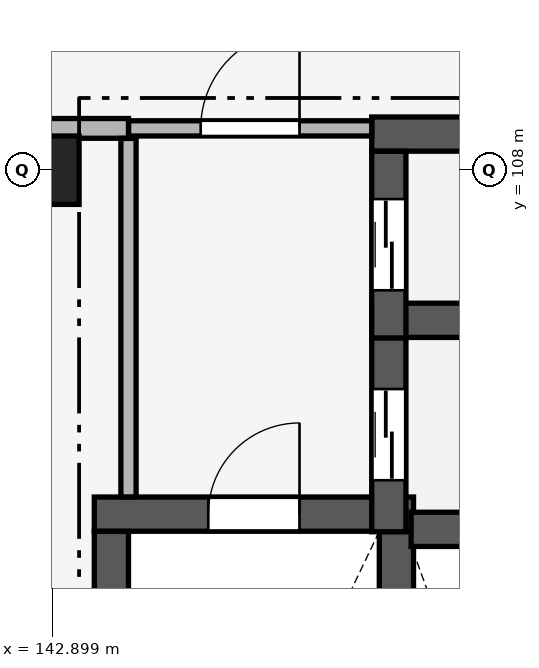
"""IFC4 building model, lengths in metres.
Left out: names, types, materials, properties, quantities, classifications, styles, units other than length and angle.
Written with IfcOpenShell. Run it as: python <this file> out.ifc"""

import sys

from ifc_helpers import new_model, si_unit, direction, frame, frame_2d, origin, origin_2d, place, context, subcontext, project, spatial, rectangle, extrude, element, fill, save


model = new_model("IFC4")
c1 = context("Model", 3, precision=1e-05, world=origin(), true_north=direction((0.0, 1.0)))
c2 = subcontext(c1, "Body", "Model", "MODEL_VIEW")
j1 = project(units=[si_unit("LENGTHUNIT", "METRE"), si_unit("PLANEANGLEUNIT", "RADIAN")], contexts=[c1])
p1 = place(None, origin())
s1 = spatial("IfcSite", under=j1, at=p1, CompositionType="ELEMENT")
p2 = place(p1, origin())
s2 = spatial("IfcBuilding", under=s1, at=p2, CompositionType="ELEMENT")
p3 = place(p2, frame((0.0, 0.0, 5.1)))
s3 = spatial("IfcBuildingStorey", under=s2, at=p3, CompositionType="ELEMENT", Elevation=5.1)
p4 = place(p3, frame((142.8, 108.0, 0.0), z_axis=(0.0, 0.0, 1.0), x_axis=(1.0, 0.0, 0.0)))
e1 = element("IfcColumn", 1, at=p4, inside=s3, PredefinedType="COLUMN", context=c2, shape_type="SweptSolid", body=[
    extrude(rectangle(XDim=0.9, YDim=0.9, at=origin_2d()), origin(), (0.0, 0.0, 1.0), 5.1),
])
p5 = place(p3, frame((143.45, 103.475, 0.0), z_axis=(0.0, 0.0, 1.0), x_axis=(1.0, 0.0, 0.0)))
e2 = element("IfcWall", 2, at=p5, inside=s3, PredefinedType="SHEAR", context=c2, shape_type="SweptSolid", body=[
    extrude(rectangle(XDim=4.2, YDim=0.45, at=frame_2d((2.1, 0.0))), origin(), (0.0, 0.0, 1.0), 4.82),
])
p6 = place(p5, frame((1.5, 0.0, 0.0)))
e3 = element("IfcOpeningElement", 3, at=p6, cuts=e2, PredefinedType="OPENING", context=c2, shape_type="SweptSolid", body=[
    extrude(rectangle(XDim=1.2, YDim=2.2, at=frame_2d((0.6, 1.1))), frame((0.0, 0.24, 0.0), z_axis=(0.0, -1.0, 0.0), x_axis=(1.0, 0.0, 0.0)), (0.0, 0.0, 1.0), 0.48),
])
for number, where, z_axis, x_axis in (
    (4, (143.675, 96.352, 0.0), (0.0, 0.0, 1.0), (0.0, 1.0, 0.0)),
    (5, (147.425, 96.352, 0.0), (0.0, 0.0, 1.0), (0.0, 1.0, 0.0)),
):
    element("IfcWall", number, at=place(p3, frame(where, z_axis=z_axis, x_axis=x_axis)), inside=s3, PredefinedType="SHEAR", context=c2, shape_type="SweptSolid", body=[
        extrude(rectangle(XDim=6.896, YDim=0.45, at=frame_2d((3.448, 0.0))), origin(), (0.0, 0.0, 1.0), 4.82),
    ])
p7 = place(p3, frame((147.618, 103.275, 0.0), z_axis=(0.0, 0.0, 1.0), x_axis=(1.0, 0.0, 0.0)))
e6 = element("IfcWall", 6, at=p7, inside=s3, PredefinedType="SHEAR", context=c2, shape_type="SweptSolid", body=[
    extrude(rectangle(XDim=2.882, YDim=0.45, at=frame_2d((1.441, 0.0))), origin(), (0.0, 0.0, 1.0), 4.82),
])
p8 = place(p3, frame((147.1, 106.025, 0.0), z_axis=(0.0, 0.0, 1.0), x_axis=(1.0, 0.0, 0.0)))
e7 = element("IfcWall", 7, at=p8, inside=s3, PredefinedType="SHEAR", context=c2, shape_type="SweptSolid", body=[
    extrude(rectangle(XDim=3.4, YDim=0.45, at=frame_2d((1.7, 0.0))), origin(), (0.0, 0.0, 1.0), 4.82),
])
p9 = place(p3, frame((147.325, 103.243, 0.0), z_axis=(0.0, 0.0, 1.0), x_axis=(0.0, 1.0, 0.0)))
e8 = element("IfcWall", 8, at=p9, inside=s3, PredefinedType="SHEAR", context=c2, shape_type="SweptSolid", body=[
    extrude(rectangle(XDim=2.555, YDim=0.45, at=frame_2d((1.278, 0.0))), origin(), (0.0, 0.0, 1.0), 4.82),
])
p10 = place(p9, frame((0.678, 0.0, 0.0)))
e9 = element("IfcOpeningElement", 9, at=p10, cuts=e8, PredefinedType="OPENING", context=c2, shape_type="SweptSolid", body=[
    extrude(rectangle(XDim=1.2, YDim=2.15, at=frame_2d((0.6, 1.075))), frame((0.0, 0.24, 0.0), z_axis=(0.0, -1.0, 0.0), x_axis=(1.0, 0.0, 0.0)), (0.0, 0.0, 1.0), 0.48),
])
p11 = place(p3, frame((147.1, 108.475, 0.0), z_axis=(0.0, 0.0, 1.0), x_axis=(1.0, 0.0, 0.0)))
e10 = element("IfcWall", 10, at=p11, inside=s3, PredefinedType="SHEAR", context=c2, shape_type="SweptSolid", body=[
    extrude(rectangle(XDim=3.656, YDim=0.45, at=frame_2d((1.828, 0.0))), origin(), (0.0, 0.0, 1.0), 4.82),
])
p12 = place(p3, frame((147.325, 105.793, 0.0), z_axis=(0.0, 0.0, 1.0), x_axis=(0.0, 1.0, 0.0)))
e11 = element("IfcWall", 11, at=p12, inside=s3, PredefinedType="SHEAR", context=c2, shape_type="SweptSolid", body=[
    extrude(rectangle(XDim=2.455, YDim=0.45, at=frame_2d((1.228, 0.0))), origin(), (0.0, 0.0, 1.0), 4.82),
])
p13 = place(p12, frame((0.627, 0.0, 0.0)))
e12 = element("IfcOpeningElement", 12, at=p13, cuts=e11, PredefinedType="OPENING", context=c2, shape_type="SweptSolid", body=[
    extrude(rectangle(XDim=1.2, YDim=2.15, at=frame_2d((0.6, 1.075))), frame((0.0, 0.24, 0.0), z_axis=(0.0, -1.0, 0.0), x_axis=(1.0, 0.0, 0.0)), (0.0, 0.0, 1.0), 0.48),
])
p14 = place(p3, frame((143.9, 108.55, 0.0), z_axis=(0.0, 0.0, 1.0), x_axis=(1.0, 0.0, 0.0)))
e13 = element("IfcWall", 13, at=p14, inside=s3, PredefinedType="PARTITIONING", context=c2, shape_type="SweptSolid", body=[
    extrude(rectangle(XDim=3.2, YDim=0.2, at=frame_2d((1.6, 0.0))), origin(), (0.0, 0.0, 1.0), 4.82),
])
p15 = place(p14, frame((0.95, 0.0, 0.0)))
e14 = element("IfcOpeningElement", 14, at=p15, cuts=e13, PredefinedType="OPENING", context=c2, shape_type="SweptSolid", body=[
    extrude(rectangle(XDim=1.3, YDim=2.2, at=frame_2d((0.65, 1.1))), frame((0.0, 0.115, 0.0), z_axis=(0.0, -1.0, 0.0), x_axis=(1.0, 0.0, 0.0)), (0.0, 0.0, 1.0), 0.23),
])
p16 = place(p3, frame((142.355, 108.55, 0.0), z_axis=(0.0, 0.0, 1.0), x_axis=(1.0, 0.0, 0.0)))
e15 = element("IfcWall", 15, at=p16, inside=s3, PredefinedType="PARTITIONING", context=c2, shape_type="SweptSolid", body=[
    extrude(rectangle(XDim=1.545, YDim=0.26, at=frame_2d((0.772, 0.0))), origin(), (0.0, 0.0, 1.0), 4.27),
])
p17 = place(p3, frame((143.9, 103.702, 0.0), z_axis=(0.0, 0.0, 1.0), x_axis=(0.0, 1.0, 0.0)))
e16 = element("IfcWall", 16, at=p17, inside=s3, PredefinedType="PARTITIONING", context=c2, shape_type="SweptSolid", body=[
    extrude(rectangle(XDim=4.716, YDim=0.2, at=frame_2d((2.358, 0.0))), origin(), (0.0, 0.0, 1.0), 4.82),
])
p18 = place(p6, origin())
e17 = element("IfcDoor", 17, at=p18, inside=s3, OperationType="SINGLE_SWING_RIGHT", PredefinedType="DOOR", context=c2, shape_type="SweptSolid", body=[
    extrude(rectangle(XDim=1.2, YDim=2.2, at=frame_2d((0.6, 1.1))), frame((0.0, 0.025, 0.0), z_axis=(0.0, -1.0, 0.0), x_axis=(1.0, 0.0, 0.0)), (0.0, 0.0, 1.0), 0.05),
])
fill(e3, e17)
p19 = place(p10, origin())
e18 = element("IfcDoor", 18, at=p19, inside=s3, OperationType="DOUBLE_DOOR_SLIDING", PredefinedType="DOOR", context=c2, shape_type="SweptSolid", body=[
    extrude(rectangle(XDim=1.2, YDim=2.15, at=frame_2d((0.6, 1.075))), frame((0.0, 0.025, 0.0), z_axis=(0.0, -1.0, 0.0), x_axis=(1.0, 0.0, 0.0)), (0.0, 0.0, 1.0), 0.05),
])
fill(e9, e18)
p20 = place(p13, origin())
e19 = element("IfcDoor", 19, at=p20, inside=s3, OperationType="DOUBLE_DOOR_SLIDING", PredefinedType="DOOR", context=c2, shape_type="SweptSolid", body=[
    extrude(rectangle(XDim=1.2, YDim=2.15, at=frame_2d((0.6, 1.075))), frame((0.0, 0.025, 0.0), z_axis=(0.0, -1.0, 0.0), x_axis=(1.0, 0.0, 0.0)), (0.0, 0.0, 1.0), 0.05),
])
fill(e12, e19)
p21 = place(p15, origin())
e20 = element("IfcDoor", 20, at=p21, inside=s3, OperationType="SINGLE_SWING_RIGHT", PredefinedType="DOOR", context=c2, shape_type="SweptSolid", body=[
    extrude(rectangle(XDim=1.3, YDim=2.2, at=frame_2d((0.65, 1.1))), frame((0.0, 0.025, 0.0), z_axis=(0.0, -1.0, 0.0), x_axis=(1.0, 0.0, 0.0)), (0.0, 0.0, 1.0), 0.05),
])
fill(e14, e20)
save(model, sys.argv[1])
